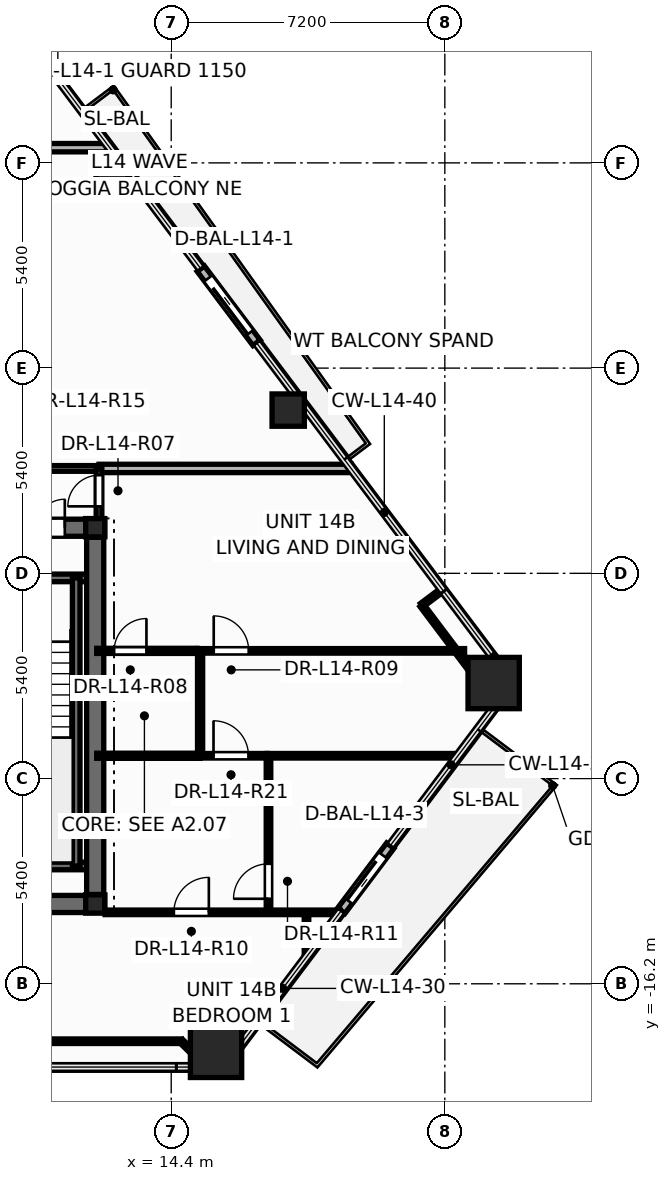
"""IFC4 building model, lengths in metres.
Left out: names, types, materials, properties, quantities, classifications, styles, units other than length and angle.
Written with IfcOpenShell. Run it as: python <this file> out.ifc"""

import sys

from ifc_helpers import new_model, si_unit, direction, frame, frame_2d, origin, origin_2d, place, context, subcontext, project, spatial, rectangle, hollow_rectangle, hollow_circle, i_section, extrude, element, fill, save


model = new_model("IFC4")
c1 = context("Model", 3, precision=1e-05, world=origin(), true_north=direction((0.0, 1.0)))
c2 = subcontext(c1, "Body", "Model", "MODEL_VIEW")
j1 = project(units=[si_unit("LENGTHUNIT", "METRE"), si_unit("PLANEANGLEUNIT", "RADIAN")], contexts=[c1])
p1 = place(None, origin())
s1 = spatial("IfcSite", under=j1, at=p1, CompositionType="ELEMENT")
p2 = place(p1, origin())
s2 = spatial("IfcBuilding", under=s1, at=p2, CompositionType="ELEMENT")
p3 = place(p2, frame((0.0, 0.0, 56.7)))
s3 = spatial("IfcBuildingStorey", under=s2, at=p3, CompositionType="ELEMENT", Elevation=56.7)
for number, where, z_axis, x_axis in (
    (1, (15.58, -17.991, 0.0), (0.0, 0.0, 1.0), (1.0, 0.0, 0.0)),
    (2, (22.885, -8.287, 0.0), (0.0, 0.0, 1.0), (1.0, 0.0, 0.0)),
):
    element("IfcColumn", number, at=place(p3, frame(where, z_axis=z_axis, x_axis=x_axis)), inside=s3, PredefinedType="COLUMN", context=c2, shape_type="SweptSolid", body=[
        extrude(hollow_rectangle(XDim=1.35, YDim=1.35, WallThickness=0.065, at=origin_2d()), origin(), (0.0, 0.0, 1.0), 3.6),
    ])
for number, where, z_axis, x_axis in (
    (3, (17.479, -1.104, 0.0), (0.0, 0.0, 1.0), (1.0, 0.0, 0.0)),
    (4, (12.844, 5.051, 0.0), (0.0, 0.0, 1.0), (1.0, 0.0, 0.0)),
):
    element("IfcColumn", number, at=place(p3, frame(where, z_axis=z_axis, x_axis=x_axis)), inside=s3, PredefinedType="COLUMN", context=c2, shape_type="SweptSolid", body=[
        extrude(hollow_circle(Radius=0.425, WallThickness=0.038, at=origin_2d()), origin(), (0.0, 0.0, 1.0), 3.6),
    ])
for number, where, z_axis, x_axis in (
    (5, (12.4, -14.1, 0.0), (0.0, 0.0, 1.0), (1.0, 0.0, 0.0)),
    (6, (12.4, -4.2, 0.0), (0.0, 0.0, 1.0), (1.0, 0.0, 0.0)),
):
    element("IfcColumn", number, at=place(p3, frame(where, z_axis=z_axis, x_axis=x_axis)), inside=s3, PredefinedType="COLUMN", context=c2, shape_type="SweptSolid", body=[
        extrude(i_section(OverallWidth=0.5, OverallDepth=0.482, WebThickness=0.04, FlangeThickness=0.045, at=origin_2d()), origin(), (0.0, 0.0, 1.0), 3.6),
    ])
p4 = place(p3, frame((16.646, 0.666, -0.015), z_axis=(0.0, 0.0, 1.0), x_axis=(-0.601471893772, 0.79889396105, 0.0)))
e7 = element("IfcWall", 7, at=p4, inside=s3, PredefinedType="STANDARD", context=c2, shape_type="SweptSolid", body=[
    extrude(rectangle(XDim=2.44, YDim=0.24, at=frame_2d((1.22, 0.0))), origin(), (0.0, 0.0, 1.0), 2.698),
])
p5 = place(p4, frame((0.32, 0.0, 0.015)))
e8 = element("IfcOpeningElement", 8, at=p5, cuts=e7, PredefinedType="OPENING", context=c2, shape_type="SweptSolid", body=[
    extrude(rectangle(XDim=1.806, YDim=2.204, at=frame_2d((0.9, 1.102))), frame((0.0, 0.13, 0.0), z_axis=(0.0, -1.0, 0.0), x_axis=(1.0, 0.0, 0.0)), (0.0, 0.0, 1.0), 0.26),
])
p6 = place(p3, frame((18.877, -14.276, -0.015), z_axis=(0.0, 0.0, 1.0), x_axis=(0.601441023505, 0.798917201746, 0.0)))
e9 = element("IfcWall", 9, at=p6, inside=s3, PredefinedType="STANDARD", context=c2, shape_type="SweptSolid", body=[
    extrude(rectangle(XDim=2.14, YDim=0.24, at=frame_2d((1.07, 0.0))), origin(), (0.0, 0.0, 1.0), 2.698),
])
p7 = place(p6, frame((0.32, 0.0, 0.015)))
e10 = element("IfcOpeningElement", 10, at=p7, cuts=e9, PredefinedType="OPENING", context=c2, shape_type="SweptSolid", body=[
    extrude(rectangle(XDim=1.506, YDim=2.204, at=frame_2d((0.75, 1.102))), frame((0.0, 0.13, 0.0), z_axis=(0.0, -1.0, 0.0), x_axis=(1.0, 0.0, 0.0)), (0.0, 0.0, 1.0), 0.26),
])
p8 = place(p3, frame((-12.65, -14.1, 0.0), z_axis=(0.0, 0.0, 1.0), x_axis=(1.0, 0.0, 0.0)))
e11 = element("IfcWall", 11, at=p8, inside=s3, PredefinedType="SHEAR", context=c2, shape_type="SweptSolid", body=[
    extrude(rectangle(XDim=25.3, YDim=0.45, at=frame_2d((12.65, 0.0))), origin(), (0.0, 0.0, 1.0), 3.6),
])
p9 = place(p3, frame((-12.65, -4.2, 0.0), z_axis=(0.0, 0.0, 1.0), x_axis=(1.0, 0.0, 0.0)))
e12 = element("IfcWall", 12, at=p9, inside=s3, PredefinedType="SHEAR", context=c2, shape_type="SweptSolid", body=[
    extrude(rectangle(XDim=25.3, YDim=0.45, at=frame_2d((12.65, 0.0))), origin(), (0.0, 0.0, 1.0), 3.6),
])
p10 = place(p9, frame((0.95, 0.0, 0.0)))
e13 = element("IfcOpeningElement", 13, at=p10, cuts=e12, PredefinedType="OPENING", context=c2, shape_type="SweptSolid", body=[
    extrude(rectangle(XDim=0.756, YDim=2.054, at=frame_2d((0.375, 1.027))), frame((0.0, 0.235, 0.0), z_axis=(0.0, -1.0, 0.0), x_axis=(1.0, 0.0, 0.0)), (0.0, 0.0, 1.0), 0.47),
])
p11 = place(p9, frame((2.6, 0.0, 0.0)))
e14 = element("IfcOpeningElement", 14, at=p11, cuts=e12, PredefinedType="OPENING", context=c2, shape_type="SweptSolid", body=[
    extrude(rectangle(XDim=0.756, YDim=2.054, at=frame_2d((0.375, 1.027))), frame((0.0, 0.235, 0.0), z_axis=(0.0, -1.0, 0.0), x_axis=(1.0, 0.0, 0.0)), (0.0, 0.0, 1.0), 0.47),
])
p12 = place(p9, frame((21.85, 0.0, 0.0)))
e15 = element("IfcOpeningElement", 15, at=p12, cuts=e12, PredefinedType="OPENING", context=c2, shape_type="SweptSolid", body=[
    extrude(rectangle(XDim=0.756, YDim=2.054, at=frame_2d((0.375, 1.027))), frame((0.0, 0.235, 0.0), z_axis=(0.0, -1.0, 0.0), x_axis=(1.0, 0.0, 0.0)), (0.0, 0.0, 1.0), 0.47),
])
p13 = place(p9, frame((23.5, 0.0, 0.0)))
e16 = element("IfcOpeningElement", 16, at=p13, cuts=e12, PredefinedType="OPENING", context=c2, shape_type="SweptSolid", body=[
    extrude(rectangle(XDim=0.756, YDim=2.054, at=frame_2d((0.375, 1.027))), frame((0.0, 0.235, 0.0), z_axis=(0.0, -1.0, 0.0), x_axis=(1.0, 0.0, 0.0)), (0.0, 0.0, 1.0), 0.47),
])
p14 = place(p9, frame((5.85, 0.0, 0.0)))
e17 = element("IfcOpeningElement", 17, at=p14, cuts=e12, PredefinedType="OPENING", context=c2, shape_type="SweptSolid", body=[
    extrude(rectangle(XDim=1.006, YDim=2.104, at=frame_2d((0.5, 1.052))), frame((0.0, 0.235, 0.0), z_axis=(0.0, -1.0, 0.0), x_axis=(1.0, 0.0, 0.0)), (0.0, 0.0, 1.0), 0.47),
])
p15 = place(p9, frame((10.35, 0.0, 0.0)))
e18 = element("IfcOpeningElement", 18, at=p15, cuts=e12, PredefinedType="OPENING", context=c2, shape_type="SweptSolid", body=[
    extrude(rectangle(XDim=1.406, YDim=2.154, at=frame_2d((0.7, 1.077))), frame((0.0, 0.235, 0.0), z_axis=(0.0, -1.0, 0.0), x_axis=(1.0, 0.0, 0.0)), (0.0, 0.0, 1.0), 0.47),
])
p16 = place(p9, frame((18.45, 0.0, 0.0)))
e19 = element("IfcOpeningElement", 19, at=p16, cuts=e12, PredefinedType="OPENING", context=c2, shape_type="SweptSolid", body=[
    extrude(rectangle(XDim=1.006, YDim=2.104, at=frame_2d((0.5, 1.052))), frame((0.0, 0.235, 0.0), z_axis=(0.0, -1.0, 0.0), x_axis=(1.0, 0.0, 0.0)), (0.0, 0.0, 1.0), 0.47),
])
for number, where, z_axis, x_axis in (
    (20, (8.48, -5.52, 0.0), (0.0, 0.0, 1.0), (1.0, 0.0, 0.0)),
    (21, (8.48, -13.1, 0.0), (0.0, 0.0, 1.0), (1.0, 0.0, 0.0)),
):
    element("IfcWall", number, at=place(p3, frame(where, z_axis=z_axis, x_axis=x_axis)), inside=s3, PredefinedType="SOLIDWALL", context=c2, shape_type="SweptSolid", body=[
        extrude(rectangle(XDim=3.87, YDim=0.2, at=frame_2d((1.935, 0.0))), origin(), (0.0, 0.0, 1.0), 3.6),
    ])
p17 = place(p3, frame((11.9, -13.1, 0.0), z_axis=(0.0, 0.0, 1.0), x_axis=(0.0, 1.0, 0.0)))
e22 = element("IfcWall", 22, at=p17, inside=s3, PredefinedType="SOLIDWALL", context=c2, shape_type="SweptSolid", body=[
    extrude(rectangle(XDim=7.58, YDim=0.2, at=frame_2d((3.79, 0.0))), origin(), (0.0, 0.0, 1.0), 3.6),
])
p18 = place(p3, frame((12.4, -13.85, 0.0), z_axis=(0.0, 0.0, 1.0), x_axis=(0.0, 1.0, 0.0)))
e23 = element("IfcWall", 23, at=p18, inside=s3, PredefinedType="SHEAR", context=c2, shape_type="SweptSolid", body=[
    extrude(rectangle(XDim=9.4, YDim=0.45, at=frame_2d((4.7, 0.0))), origin(), (0.0, 0.0, 1.0), 3.6),
])
p19 = place(p3, frame((15.08, -7.44, 0.0), z_axis=(0.0, 0.0, 1.0), x_axis=(1.0, 0.0, 0.0)))
e24 = element("IfcWall", 24, at=p19, inside=s3, PredefinedType="PARTITIONING", context=c2, shape_type="SweptSolid", body=[
    extrude(rectangle(XDim=7.04, YDim=0.12, at=frame_2d((3.52, 0.0))), origin(), (0.0, 0.0, 1.0), 2.295),
])
p20 = place(p19, frame((0.439, 0.0, 0.0)))
e25 = element("IfcOpeningElement", 25, at=p20, cuts=e24, PredefinedType="OPENING", context=c2, shape_type="SweptSolid", body=[
    extrude(rectangle(XDim=0.926, YDim=2.104, at=frame_2d((0.46, 1.052))), frame((0.0, 0.07, 0.0), z_axis=(0.0, -1.0, 0.0), x_axis=(1.0, 0.0, 0.0)), (0.0, 0.0, 1.0), 0.14),
])
p21 = place(p3, frame((12.5, -2.64, 0.0), z_axis=(0.0, 0.0, 1.0), x_axis=(1.0, 0.0, 0.0)))
e26 = element("IfcWall", 26, at=p21, inside=s3, PredefinedType="PARTITIONING", context=c2, shape_type="SweptSolid", body=[
    extrude(rectangle(XDim=6.635, YDim=0.22, at=frame_2d((3.318, 0.0))), origin(), (0.0, 0.0, 1.0), 2.683),
])
p22 = place(p3, frame((12.66, -14.32, 0.0), z_axis=(0.0, 0.0, 1.0), x_axis=(1.0, 0.0, 0.0)))
e27 = element("IfcWall", 27, at=p22, inside=s3, PredefinedType="PARTITIONING", context=c2, shape_type="SweptSolid", body=[
    extrude(rectangle(XDim=6.184, YDim=0.12, at=frame_2d((3.092, 0.0))), origin(), (0.0, 0.0, 1.0), 2.683),
])
p23 = place(p22, frame((1.81, 0.0, 0.0)))
e28 = element("IfcOpeningElement", 28, at=p23, cuts=e27, PredefinedType="OPENING", context=c2, shape_type="SweptSolid", body=[
    extrude(rectangle(XDim=0.926, YDim=2.104, at=frame_2d((0.46, 1.052))), frame((0.0, 0.07, 0.0), z_axis=(0.0, -1.0, 0.0), x_axis=(1.0, 0.0, 0.0)), (0.0, 0.0, 1.0), 0.14),
])
p24 = place(p3, frame((16.92, -10.2, 0.0), z_axis=(0.0, 0.0, 1.0), x_axis=(1.0, 0.0, 0.0)))
e29 = element("IfcWall", 29, at=p24, inside=s3, PredefinedType="PARTITIONING", context=c2, shape_type="SweptSolid", body=[
    extrude(rectangle(XDim=5.026, YDim=0.12, at=frame_2d((2.513, 0.0))), origin(), (0.0, 0.0, 1.0), 2.683),
])
p25 = place(p3, frame((16.96, -14.32, 0.0), z_axis=(0.0, 0.0, 1.0), x_axis=(0.0, 1.0, 0.0)))
e30 = element("IfcWall", 30, at=p25, inside=s3, PredefinedType="PARTITIONING", context=c2, shape_type="SweptSolid", body=[
    extrude(rectangle(XDim=4.12, YDim=0.12, at=frame_2d((2.06, 0.0))), origin(), (0.0, 0.0, 1.0), 3.32),
])
p26 = place(p25, frame((0.357, 0.0, 0.0)))
e31 = element("IfcOpeningElement", 31, at=p26, cuts=e30, PredefinedType="OPENING", context=c2, shape_type="SweptSolid", body=[
    extrude(rectangle(XDim=0.926, YDim=2.104, at=frame_2d((0.46, 1.052))), frame((0.0, 0.07, 0.0), z_axis=(0.0, -1.0, 0.0), x_axis=(1.0, 0.0, 0.0)), (0.0, 0.0, 1.0), 0.14),
])
p27 = place(p3, frame((10.707, -17.711, 0.0), z_axis=(0.0, 0.0, 1.0), x_axis=(1.0, 0.0, 0.0)))
e32 = element("IfcWall", 32, at=p27, inside=s3, PredefinedType="PARTITIONING", context=c2, shape_type="SweptSolid", body=[
    extrude(rectangle(XDim=3.959, YDim=0.12, at=frame_2d((1.979, 0.0))), origin(), (0.0, 0.0, 1.0), 3.32),
])
p28 = place(p3, frame((9.24, 5.8, 0.0), z_axis=(0.0, 0.0, 1.0), x_axis=(1.0, 0.0, 0.0)))
e33 = element("IfcWall", 33, at=p28, inside=s3, PredefinedType="PARTITIONING", context=c2, shape_type="SweptSolid", body=[
    extrude(rectangle(XDim=3.542, YDim=0.22, at=frame_2d((1.771, 0.0))), origin(), (0.0, 0.0, 1.0), 2.479),
])
p29 = place(p3, frame((9.24, -2.64, 0.0), z_axis=(0.0, 0.0, 1.0), x_axis=(1.0, 0.0, 0.0)))
e34 = element("IfcWall", 34, at=p29, inside=s3, PredefinedType="PARTITIONING", context=c2, shape_type="SweptSolid", body=[
    extrude(rectangle(XDim=3.26, YDim=0.15, at=frame_2d((1.63, 0.0))), origin(), (0.0, 0.0, 1.0), 3.32),
])
p30 = place(p3, frame((12.44, -7.44, 0.0), z_axis=(0.0, 0.0, 1.0), x_axis=(1.0, 0.0, 0.0)))
e35 = element("IfcWall", 35, at=p30, inside=s3, PredefinedType="PARTITIONING", context=c2, shape_type="SweptSolid", body=[
    extrude(rectangle(XDim=2.638, YDim=0.135, at=frame_2d((1.319, 0.0))), origin(), (0.0, 0.0, 1.0), 2.683),
])
p31 = place(p30, frame((0.458, 0.0, 0.0)))
e36 = element("IfcOpeningElement", 36, at=p31, cuts=e35, PredefinedType="OPENING", context=c2, shape_type="SweptSolid", body=[
    extrude(rectangle(XDim=0.856, YDim=2.104, at=frame_2d((0.425, 1.052))), frame((0.0, 0.078, 0.0), z_axis=(0.0, -1.0, 0.0), x_axis=(1.0, 0.0, 0.0)), (0.0, 0.0, 1.0), 0.155),
])
p32 = place(p3, frame((15.16, -10.2, 0.0), z_axis=(0.0, 0.0, 1.0), x_axis=(0.0, 1.0, 0.0)))
e37 = element("IfcWall", 37, at=p32, inside=s3, PredefinedType="PARTITIONING", context=c2, shape_type="SweptSolid", body=[
    extrude(rectangle(XDim=2.76, YDim=0.135, at=frame_2d((1.38, 0.0))), origin(), (0.0, 0.0, 1.0), 3.32),
])
p33 = place(p3, frame((12.44, -10.2, 0.0), z_axis=(0.0, 0.0, 1.0), x_axis=(1.0, 0.0, 0.0)))
e38 = element("IfcWall", 38, at=p33, inside=s3, PredefinedType="PARTITIONING", context=c2, shape_type="SweptSolid", body=[
    extrude(rectangle(XDim=2.72, YDim=0.135, at=frame_2d((1.36, 0.0))), origin(), (0.0, 0.0, 1.0), 2.683),
])
p34 = place(p3, frame((15.16, -10.2, 0.0), z_axis=(0.0, 0.0, 1.0), x_axis=(1.0, 0.0, 0.0)))
e39 = element("IfcWall", 39, at=p34, inside=s3, PredefinedType="PARTITIONING", context=c2, shape_type="SweptSolid", body=[
    extrude(rectangle(XDim=1.758, YDim=0.12, at=frame_2d((0.879, 0.0))), origin(), (0.0, 0.0, 1.0), 3.32),
])
p35 = place(p34, frame((0.353, 0.0, 0.0)))
e40 = element("IfcOpeningElement", 40, at=p35, cuts=e39, PredefinedType="OPENING", context=c2, shape_type="SweptSolid", body=[
    extrude(rectangle(XDim=0.926, YDim=2.104, at=frame_2d((0.46, 1.052))), frame((0.0, 0.07, 0.0), z_axis=(0.0, -1.0, 0.0), x_axis=(1.0, 0.0, 0.0)), (0.0, 0.0, 1.0), 0.14),
])
p36 = place(p3, frame((22.345, -8.034, 0.0), z_axis=(0.0, 0.0, 1.0), x_axis=(-0.601407243549, 0.798942630861, 0.0)))
e41 = element("IfcWall", 41, at=p36, inside=s3, PredefinedType="PARTITIONING", context=c2, shape_type="SweptSolid", body=[
    extrude(rectangle(XDim=2.247, YDim=0.12, at=frame_2d((1.124, 0.0))), origin(), (0.0, 0.0, 1.0), 2.295),
])
p37 = place(p3, frame((12.5, -4.24, 0.0), z_axis=(0.0, 0.0, 1.0), x_axis=(0.0, 1.0, 0.0)))
e42 = element("IfcWall", 42, at=p37, inside=s3, PredefinedType="PARTITIONING", context=c2, shape_type="SweptSolid", body=[
    extrude(rectangle(XDim=1.6, YDim=0.15, at=frame_2d((0.8, 0.0))), origin(), (0.0, 0.0, 1.0), 2.295),
])
p38 = place(p37, frame((0.602, 0.0, 0.0)))
e43 = element("IfcOpeningElement", 43, at=p38, cuts=e42, PredefinedType="OPENING", context=c2, shape_type="SweptSolid", body=[
    extrude(rectangle(XDim=0.826, YDim=2.104, at=frame_2d((0.41, 1.052))), frame((0.0, 0.085, 0.0), z_axis=(0.0, -1.0, 0.0), x_axis=(1.0, 0.0, 0.0)), (0.0, 0.0, 1.0), 0.17),
])
p39 = place(p3, frame((17.96, -15.494, 0.0), z_axis=(0.0, 0.0, 1.0), x_axis=(0.0, 1.0, 0.0)))
e44 = element("IfcWall", 44, at=p39, inside=s3, PredefinedType="PARTITIONING", context=c2, shape_type="SweptSolid", body=[
    extrude(rectangle(XDim=1.174, YDim=0.12, at=frame_2d((0.587, 0.0))), origin(), (0.0, 0.0, 1.0), 2.683),
])
p40 = place(p3, frame((14.666, -17.711, 0.0), z_axis=(0.0, 0.0, 1.0), x_axis=(0.712544720488, -0.701626696545, 0.0)))
e45 = element("IfcWall", 45, at=p40, inside=s3, PredefinedType="PARTITIONING", context=c2, shape_type="SweptSolid", body=[
    extrude(rectangle(XDim=0.85, YDim=0.12, at=frame_2d((0.425, 0.0))), origin(), (0.0, 0.0, 1.0), 2.683),
])
p41 = place(p3, frame((23.188, -8.129, 0.0), z_axis=(0.0, 0.0, 1.0), x_axis=(-0.993721326988, 0.111883530014, 0.0)))
e46 = element("IfcWall", 46, at=p41, inside=s3, PredefinedType="PARTITIONING", context=c2, shape_type="SweptSolid", body=[
    extrude(rectangle(XDim=0.849, YDim=0.12, at=frame_2d((0.424, 0.0))), origin(), (0.0, 0.0, 1.0), 2.295),
])
p42 = place(p3, frame((20.994, -6.239, 0.0), z_axis=(0.0, 0.0, 1.0), x_axis=(0.798773936271, 0.601631281379, 0.0)))
e47 = element("IfcWall", 47, at=p42, inside=s3, PredefinedType="PARTITIONING", context=c2, shape_type="SweptSolid", body=[
    extrude(rectangle(XDim=0.67, YDim=0.12, at=frame_2d((0.335, 0.0))), origin(), (0.0, 0.0, 1.0), 2.683),
])
p43 = place(p5, origin())
e48 = element("IfcDoor", 48, at=p43, inside=s3, OperationType="SLIDING_TO_LEFT", PredefinedType="DOOR", context=c2, shape_type="SweptSolid", body=[
    extrude(rectangle(XDim=1.8, YDim=2.2, at=frame_2d((0.9, 1.1))), frame((0.0, 0.025, 0.0), z_axis=(0.0, -1.0, 0.0), x_axis=(1.0, 0.0, 0.0)), (0.0, 0.0, 1.0), 0.05),
])
fill(e8, e48)
p44 = place(p7, origin())
e49 = element("IfcDoor", 49, at=p44, inside=s3, OperationType="SLIDING_TO_RIGHT", PredefinedType="DOOR", context=c2, shape_type="SweptSolid", body=[
    extrude(rectangle(XDim=1.5, YDim=2.2, at=frame_2d((0.75, 1.1))), frame((0.0, 0.025, 0.0), z_axis=(0.0, -1.0, 0.0), x_axis=(1.0, 0.0, 0.0)), (0.0, 0.0, 1.0), 0.05),
])
fill(e10, e49)
p45 = place(p13, origin())
e50 = element("IfcDoor", 50, at=p45, inside=s3, OperationType="SINGLE_SWING_RIGHT", PredefinedType="DOOR", context=c2, shape_type="SweptSolid", body=[
    extrude(rectangle(XDim=0.75, YDim=2.05, at=frame_2d((0.375, 1.025))), frame((0.0, 0.025, 0.0), z_axis=(0.0, -1.0, 0.0), x_axis=(1.0, 0.0, 0.0)), (0.0, 0.0, 1.0), 0.05),
])
fill(e16, e50)
p46 = place(p38, origin())
e51 = element("IfcDoor", 51, at=p46, inside=s3, OperationType="SINGLE_SWING_LEFT", PredefinedType="DOOR", context=c2, shape_type="SweptSolid", body=[
    extrude(rectangle(XDim=0.82, YDim=2.1, at=frame_2d((0.41, 1.05))), frame((0.0, 0.025, 0.0), z_axis=(0.0, -1.0, 0.0), x_axis=(1.0, 0.0, 0.0)), (0.0, 0.0, 1.0), 0.05),
])
fill(e43, e51)
p47 = place(p31, origin())
e52 = element("IfcDoor", 52, at=p47, inside=s3, OperationType="SINGLE_SWING_RIGHT", PredefinedType="DOOR", context=c2, shape_type="SweptSolid", body=[
    extrude(rectangle(XDim=0.85, YDim=2.1, at=frame_2d((0.425, 1.05))), frame((0.0, 0.025, 0.0), z_axis=(0.0, -1.0, 0.0), x_axis=(1.0, 0.0, 0.0)), (0.0, 0.0, 1.0), 0.05),
])
fill(e36, e52)
p48 = place(p20, origin())
e53 = element("IfcDoor", 53, at=p48, inside=s3, OperationType="SINGLE_SWING_LEFT", PredefinedType="DOOR", context=c2, shape_type="SweptSolid", body=[
    extrude(rectangle(XDim=0.92, YDim=2.1, at=frame_2d((0.46, 1.05))), frame((0.0, 0.025, 0.0), z_axis=(0.0, -1.0, 0.0), x_axis=(1.0, 0.0, 0.0)), (0.0, 0.0, 1.0), 0.05),
])
fill(e25, e53)
p49 = place(p23, origin())
e54 = element("IfcDoor", 54, at=p49, inside=s3, OperationType="SINGLE_SWING_RIGHT", PredefinedType="DOOR", context=c2, shape_type="SweptSolid", body=[
    extrude(rectangle(XDim=0.92, YDim=2.1, at=frame_2d((0.46, 1.05))), frame((0.0, 0.025, 0.0), z_axis=(0.0, -1.0, 0.0), x_axis=(1.0, 0.0, 0.0)), (0.0, 0.0, 1.0), 0.05),
])
fill(e28, e54)
p50 = place(p26, origin())
e55 = element("IfcDoor", 55, at=p50, inside=s3, OperationType="SINGLE_SWING_LEFT", PredefinedType="DOOR", context=c2, shape_type="SweptSolid", body=[
    extrude(rectangle(XDim=0.92, YDim=2.1, at=frame_2d((0.46, 1.05))), frame((0.0, 0.025, 0.0), z_axis=(0.0, -1.0, 0.0), x_axis=(1.0, 0.0, 0.0)), (0.0, 0.0, 1.0), 0.05),
])
fill(e31, e55)
p51 = place(p35, origin())
e56 = element("IfcDoor", 56, at=p51, inside=s3, OperationType="SINGLE_SWING_LEFT", PredefinedType="DOOR", context=c2, shape_type="SweptSolid", body=[
    extrude(rectangle(XDim=0.92, YDim=2.1, at=frame_2d((0.46, 1.05))), frame((0.0, 0.025, 0.0), z_axis=(0.0, -1.0, 0.0), x_axis=(1.0, 0.0, 0.0)), (0.0, 0.0, 1.0), 0.05),
])
fill(e40, e56)
save(model, sys.argv[1])
